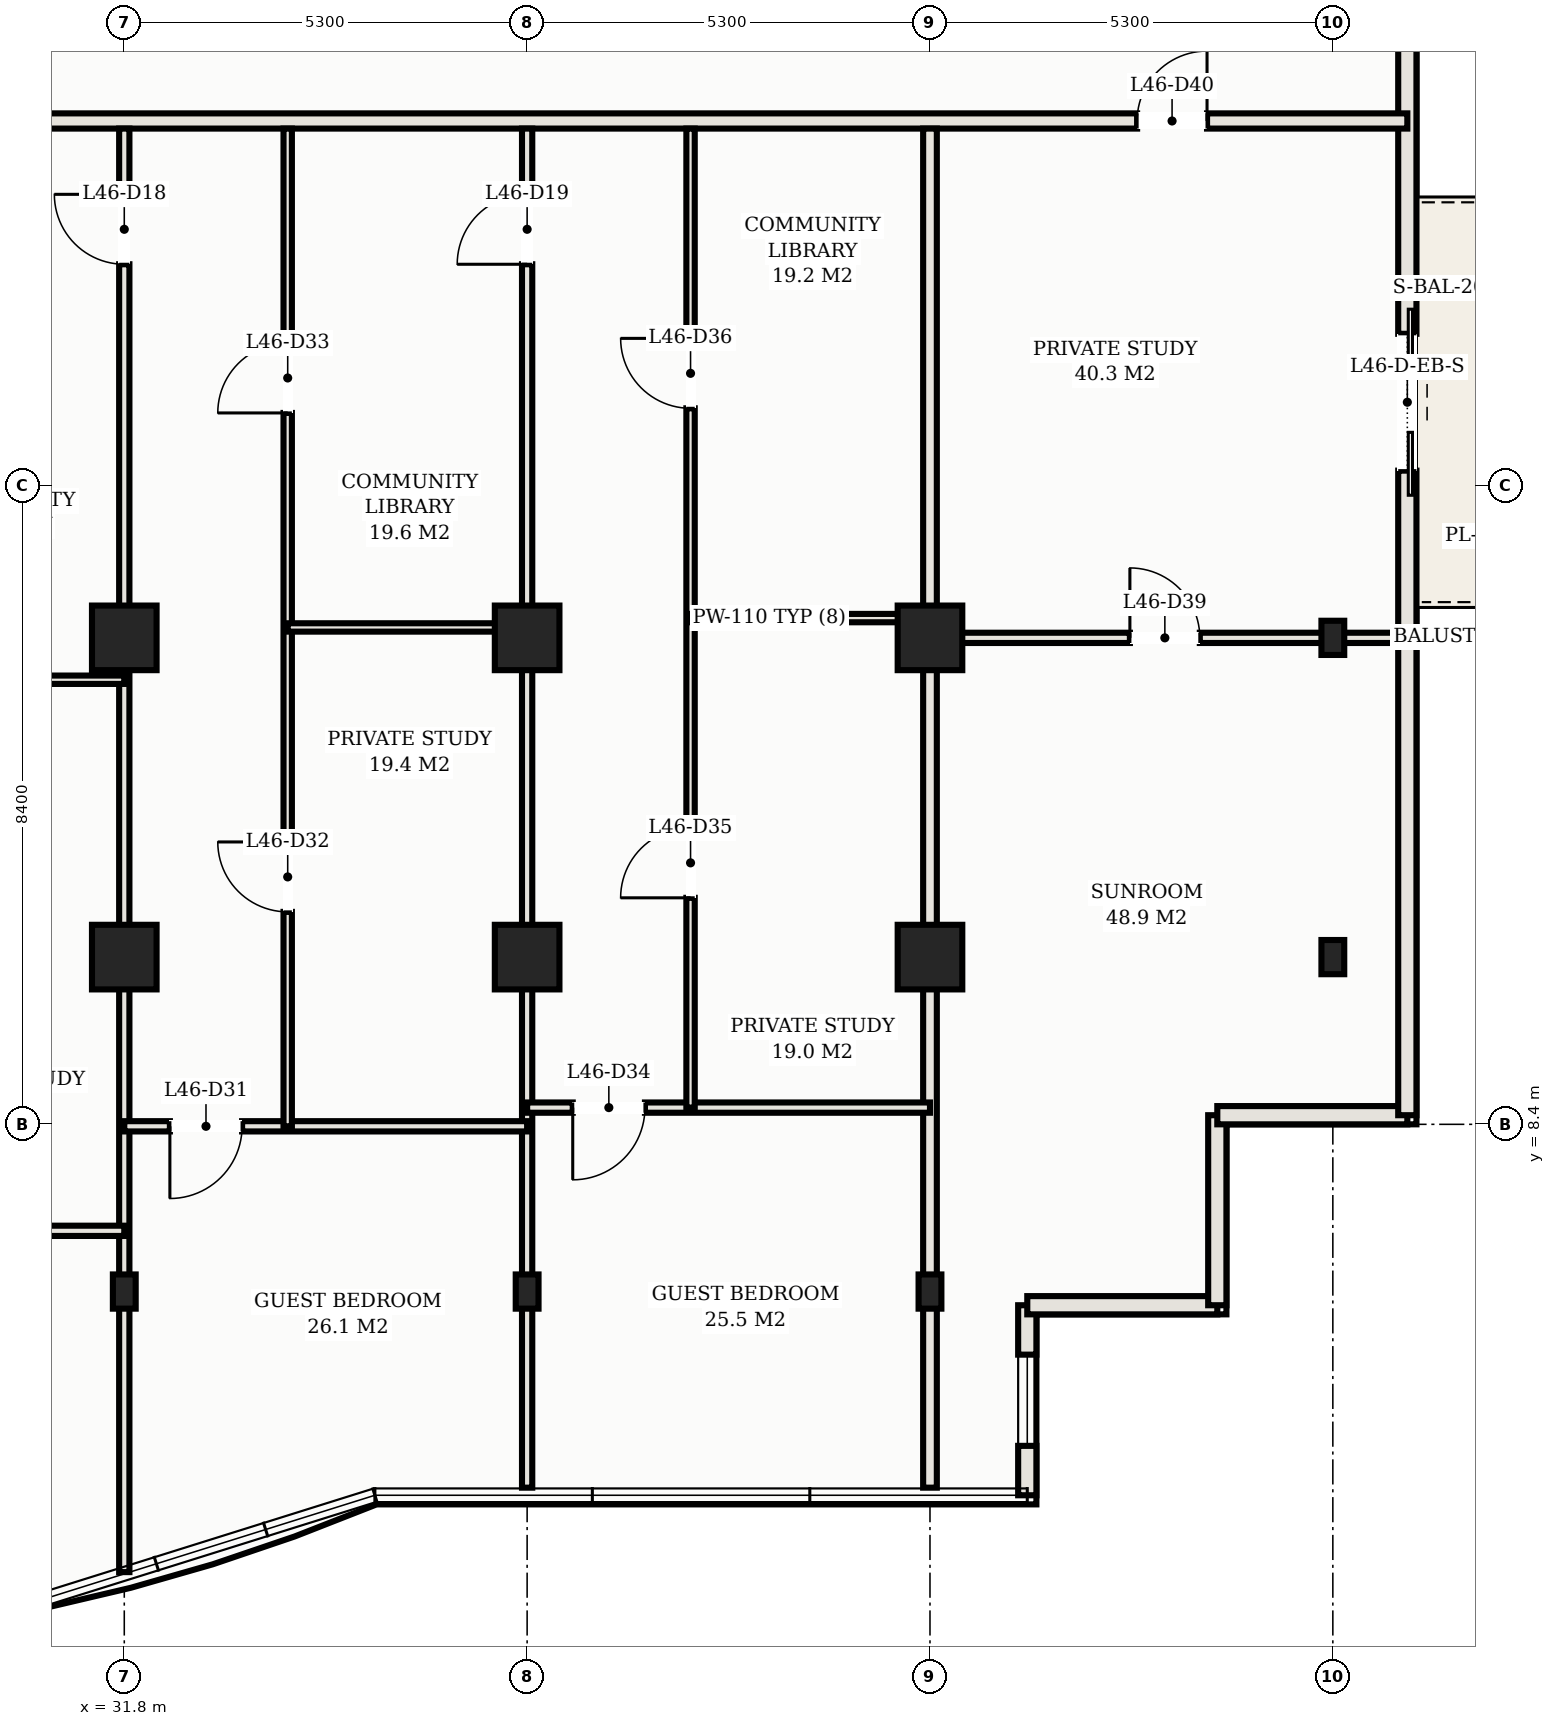
"""IFC4 building model, lengths in metres.
Left out: names, types, materials, properties, quantities, classifications, styles, units other than length and angle.
Written with IfcOpenShell. Run it as: python <this file> out.ifc"""

import sys

from ifc_helpers import new_model, si_unit, direction, frame, frame_2d, origin, origin_2d, place, context, subcontext, project, spatial, rectangle, hollow_rectangle, extrude, element, fill, save


model = new_model("IFC4")
c1 = context("Model", 3, precision=1e-05, world=origin(), true_north=direction((0.0, 1.0)))
c2 = subcontext(c1, "Body", "Model", "MODEL_VIEW")
j1 = project(units=[si_unit("LENGTHUNIT", "METRE"), si_unit("PLANEANGLEUNIT", "RADIAN")], contexts=[c1])
p1 = place(None, origin())
s1 = spatial("IfcSite", under=j1, at=p1, CompositionType="ELEMENT")
p2 = place(p1, origin())
s2 = spatial("IfcBuilding", under=s1, at=p2, CompositionType="ELEMENT")
p3 = place(p2, frame((0.0, 0.0, 168.9)))
s3 = spatial("IfcBuildingStorey", under=s2, at=p3, CompositionType="ELEMENT", Elevation=168.9)
for number, where, z_axis, x_axis in (
    (1, (31.8, 14.8, 0.0), (0.0, 0.0, 1.0), (1.0, 0.0, 0.0)),
    (2, (31.8, 10.6, 0.0), (0.0, 0.0, 1.0), (1.0, 0.0, 0.0)),
    (3, (37.1, 14.8, 0.0), (0.0, 0.0, 1.0), (1.0, 0.0, 0.0)),
    (4, (37.1, 10.6, 0.0), (0.0, 0.0, 1.0), (1.0, 0.0, 0.0)),
    (5, (42.4, 14.8, 0.0), (0.0, 0.0, 1.0), (1.0, 0.0, 0.0)),
    (6, (42.4, 10.6, 0.0), (0.0, 0.0, 1.0), (1.0, 0.0, 0.0)),
):
    element("IfcColumn", number, at=place(p3, frame(where, z_axis=z_axis, x_axis=x_axis)), inside=s3, PredefinedType="COLUMN", context=c2, shape_type="SweptSolid", body=[
        extrude(hollow_rectangle(XDim=0.85, YDim=0.85, WallThickness=0.028, at=origin_2d()), origin(), (0.0, 0.0, 1.0), 3.3),
    ])
for number, where, z_axis, x_axis in (
    (7, (31.8, 6.2, 0.0), (0.0, 0.0, 1.0), (1.0, 0.0, 0.0)),
    (8, (37.1, 6.2, 0.0), (0.0, 0.0, 1.0), (1.0, 0.0, 0.0)),
    (9, (42.4, 6.2, 0.0), (0.0, 0.0, 1.0), (1.0, 0.0, 0.0)),
    (10, (47.7, 10.6, 0.0), (0.0, 0.0, 1.0), (1.0, 0.0, 0.0)),
    (11, (47.7, 14.8, 0.0), (0.0, 0.0, 1.0), (1.0, 0.0, 0.0)),
):
    element("IfcColumn", number, at=place(p3, frame(where, z_axis=z_axis, x_axis=x_axis)), inside=s3, PredefinedType="COLUMN", context=c2, shape_type="SweptSolid", body=[
        extrude(hollow_rectangle(XDim=0.3, YDim=0.45, WallThickness=0.016, at=origin_2d()), origin(), (0.0, 0.0, 1.0), 3.3),
    ])
p4 = place(p3, frame((43.68, 3.52, 0.0), z_axis=(0.0, 0.0, 1.0), x_axis=(0.0, 1.0, 0.0)))
e12 = element("IfcWall", 12, at=p4, inside=s3, PredefinedType="SOLIDWALL", context=c2, shape_type="SweptSolid", body=[
    extrude(rectangle(XDim=2.5, YDim=0.24, at=frame_2d((1.25, 0.0))), origin(), (0.0, 0.0, 1.0), 3.1),
])
p5 = place(p4, frame((0.65, 0.0, 0.75)))
e13 = element("IfcOpeningElement", 13, at=p5, cuts=e12, PredefinedType="OPENING", context=c2, shape_type="SweptSolid", body=[
    extrude(rectangle(XDim=1.2, YDim=1.5, at=frame_2d((0.6, 0.75))), frame((0.0, 0.13, 0.0), z_axis=(0.0, -1.0, 0.0), x_axis=(1.0, 0.0, 0.0)), (0.0, 0.0, 1.0), 0.26),
])
for number, where, z_axis, x_axis in (
    (14, (43.68, 6.02, 0.0), (0.0, 0.0, 1.0), (1.0, 0.0, 0.0)),
    (15, (46.18, 6.02, 0.0), (0.0, 0.0, 1.0), (0.0, 1.0, 0.0)),
    (16, (46.18, 8.52, 0.0), (0.0, 0.0, 1.0), (1.0, 0.0, 0.0)),
):
    element("IfcWall", number, at=place(p3, frame(where, z_axis=z_axis, x_axis=x_axis)), inside=s3, PredefinedType="SOLIDWALL", context=c2, shape_type="SweptSolid", body=[
        extrude(rectangle(XDim=2.5, YDim=0.24, at=frame_2d((1.25, 0.0))), origin(), (0.0, 0.0, 1.0), 3.1),
    ])
p6 = place(p3, frame((48.68, 8.52, 0.0), z_axis=(0.0, 0.0, 1.0), x_axis=(0.0, 1.0, 0.0)))
e17 = element("IfcWall", 17, at=p6, inside=s3, PredefinedType="SOLIDWALL", context=c2, shape_type="SweptSolid", body=[
    extrude(rectangle(XDim=27.41, YDim=0.24, at=frame_2d((13.705, 0.0))), origin(), (0.0, 0.0, 1.0), 3.1),
])
p7 = place(p6, frame((8.48, 0.0, 0.0)))
e18 = element("IfcOpeningElement", 18, at=p7, cuts=e17, PredefinedType="OPENING", context=c2, shape_type="SweptSolid", body=[
    extrude(rectangle(XDim=1.8, YDim=2.2, at=frame_2d((0.9, 1.1))), frame((0.0, 0.13, 0.0), z_axis=(0.0, -1.0, 0.0), x_axis=(1.0, 0.0, 0.0)), (0.0, 0.0, 1.0), 0.26),
])
p8 = place(p3, frame((4.32, 21.6, 0.0), z_axis=(0.0, 0.0, 1.0), x_axis=(1.0, 0.0, 0.0)))
e19 = element("IfcWall", 19, at=p8, inside=s3, PredefinedType="PARTITIONING", context=c2, shape_type="SweptSolid", body=[
    extrude(rectangle(XDim=44.36, YDim=0.2, at=frame_2d((22.18, 0.0))), origin(), (0.0, 0.0, 1.0), 2.38),
])
p9 = place(p8, frame((7.03, 0.0, 0.0)))
e20 = element("IfcOpeningElement", 20, at=p9, cuts=e19, PredefinedType="OPENING", context=c2, shape_type="SweptSolid", body=[
    extrude(rectangle(XDim=1.1, YDim=2.25, at=frame_2d((0.55, 1.125))), frame((0.0, 0.11, 0.0), z_axis=(0.0, -1.0, 0.0), x_axis=(1.0, 0.0, 0.0)), (0.0, 0.0, 1.0), 0.22),
])
p10 = place(p8, frame((2.635, 0.0, 0.0)))
e21 = element("IfcOpeningElement", 21, at=p10, cuts=e19, PredefinedType="OPENING", context=c2, shape_type="SweptSolid", body=[
    extrude(rectangle(XDim=0.92, YDim=2.15, at=frame_2d((0.46, 1.075))), frame((0.0, 0.11, 0.0), z_axis=(0.0, -1.0, 0.0), x_axis=(1.0, 0.0, 0.0)), (0.0, 0.0, 1.0), 0.22),
])
p11 = place(p8, frame((40.805, 0.0, 0.0)))
e22 = element("IfcOpeningElement", 22, at=p11, cuts=e19, PredefinedType="OPENING", context=c2, shape_type="SweptSolid", body=[
    extrude(rectangle(XDim=0.92, YDim=2.15, at=frame_2d((0.46, 1.075))), frame((0.0, 0.11, 0.0), z_axis=(0.0, -1.0, 0.0), x_axis=(1.0, 0.0, 0.0)), (0.0, 0.0, 1.0), 0.22),
])
p12 = place(p3, frame((42.4, 3.62, 0.0), z_axis=(0.0, 0.0, 1.0), x_axis=(0.0, 1.0, 0.0)))
e23 = element("IfcWall", 23, at=p12, inside=s3, PredefinedType="PARTITIONING", context=c2, shape_type="SweptSolid", body=[
    extrude(rectangle(XDim=17.88, YDim=0.18, at=frame_2d((8.94, 0.0))), origin(), (0.0, 0.0, 1.0), 2.38),
])
p13 = place(p3, frame((31.8, 2.509, 0.0), z_axis=(0.0, 0.0, 1.0), x_axis=(0.0, 1.0, 0.0)))
e24 = element("IfcWall", 24, at=p13, inside=s3, PredefinedType="PARTITIONING", context=c2, shape_type="SweptSolid", body=[
    extrude(rectangle(XDim=18.991, YDim=0.135, at=frame_2d((9.496, 0.0))), origin(), (0.0, 0.0, 1.0), 2.38),
])
p14 = place(p13, frame((17.206, 0.0, 0.0)))
e25 = element("IfcOpeningElement", 25, at=p14, cuts=e24, PredefinedType="OPENING", context=c2, shape_type="SweptSolid", body=[
    extrude(rectangle(XDim=0.92, YDim=2.15, at=frame_2d((0.46, 1.075))), frame((0.0, 0.078, 0.0), z_axis=(0.0, -1.0, 0.0), x_axis=(1.0, 0.0, 0.0)), (0.0, 0.0, 1.0), 0.155),
])
p15 = place(p3, frame((37.1, 3.62, 0.0), z_axis=(0.0, 0.0, 1.0), x_axis=(0.0, 1.0, 0.0)))
e26 = element("IfcWall", 26, at=p15, inside=s3, PredefinedType="PARTITIONING", context=c2, shape_type="SweptSolid", body=[
    extrude(rectangle(XDim=17.88, YDim=0.135, at=frame_2d((8.94, 0.0))), origin(), (0.0, 0.0, 1.0), 2.38),
])
p16 = place(p15, frame((16.095, 0.0, 0.0)))
e27 = element("IfcOpeningElement", 27, at=p16, cuts=e26, PredefinedType="OPENING", context=c2, shape_type="SweptSolid", body=[
    extrude(rectangle(XDim=0.92, YDim=2.15, at=frame_2d((0.46, 1.075))), frame((0.0, 0.078, 0.0), z_axis=(0.0, -1.0, 0.0), x_axis=(1.0, 0.0, 0.0)), (0.0, 0.0, 1.0), 0.155),
])
p17 = place(p3, frame((26.5, 6.999, 0.0), z_axis=(0.0, 0.0, 1.0), x_axis=(1.0, 0.0, 0.0)))
e28 = element("IfcWall", 28, at=p17, inside=s3, PredefinedType="PARTITIONING", context=c2, shape_type="SweptSolid", body=[
    extrude(rectangle(XDim=5.3, YDim=0.135, at=frame_2d((2.65, 0.0))), origin(), (0.0, 0.0, 1.0), 2.38),
])
p18 = place(p17, frame((0.8, 0.0, 0.0)))
e29 = element("IfcOpeningElement", 29, at=p18, cuts=e28, PredefinedType="OPENING", context=c2, shape_type="SweptSolid", body=[
    extrude(rectangle(XDim=0.95, YDim=2.15, at=frame_2d((0.475, 1.075))), frame((0.0, 0.078, 0.0), z_axis=(0.0, -1.0, 0.0), x_axis=(1.0, 0.0, 0.0)), (0.0, 0.0, 1.0), 0.155),
])
p19 = place(p3, frame((28.65, 14.249, 0.0), z_axis=(0.0, 0.0, 1.0), x_axis=(1.0, 0.0, 0.0)))
e30 = element("IfcWall", 30, at=p19, inside=s3, PredefinedType="MOVABLE", context=c2, shape_type="SweptSolid", body=[
    extrude(rectangle(XDim=3.15, YDim=0.11, at=frame_2d((1.575, 0.0))), origin(), (0.0, 0.0, 1.0), 2.38),
])
p20 = place(p3, frame((31.8, 8.374, 0.0), z_axis=(0.0, 0.0, 1.0), x_axis=(1.0, 0.0, 0.0)))
e31 = element("IfcWall", 31, at=p20, inside=s3, PredefinedType="PARTITIONING", context=c2, shape_type="SweptSolid", body=[
    extrude(rectangle(XDim=5.3, YDim=0.135, at=frame_2d((2.65, 0.0))), origin(), (0.0, 0.0, 1.0), 2.38),
])
p21 = place(p20, frame((0.6, 0.0, 0.0)))
e32 = element("IfcOpeningElement", 32, at=p21, cuts=e31, PredefinedType="OPENING", context=c2, shape_type="SweptSolid", body=[
    extrude(rectangle(XDim=0.95, YDim=2.15, at=frame_2d((0.475, 1.075))), frame((0.0, 0.078, 0.0), z_axis=(0.0, -1.0, 0.0), x_axis=(1.0, 0.0, 0.0)), (0.0, 0.0, 1.0), 0.155),
])
p22 = place(p3, frame((33.95, 8.374, 0.0), z_axis=(0.0, 0.0, 1.0), x_axis=(0.0, 1.0, 0.0)))
e33 = element("IfcWall", 33, at=p22, inside=s3, PredefinedType="MOVABLE", context=c2, shape_type="SweptSolid", body=[
    extrude(rectangle(XDim=13.126, YDim=0.11, at=frame_2d((6.563, 0.0))), origin(), (0.0, 0.0, 1.0), 2.38),
])
p23 = place(p22, frame((2.821, 0.0, 0.0)))
e34 = element("IfcOpeningElement", 34, at=p23, cuts=e33, PredefinedType="OPENING", context=c2, shape_type="SweptSolid", body=[
    extrude(rectangle(XDim=0.92, YDim=2.15, at=frame_2d((0.46, 1.075))), frame((0.0, 0.065, 0.0), z_axis=(0.0, -1.0, 0.0), x_axis=(1.0, 0.0, 0.0)), (0.0, 0.0, 1.0), 0.13),
])
p24 = place(p22, frame((9.385, 0.0, 0.0)))
e35 = element("IfcOpeningElement", 35, at=p24, cuts=e33, PredefinedType="OPENING", context=c2, shape_type="SweptSolid", body=[
    extrude(rectangle(XDim=0.92, YDim=2.15, at=frame_2d((0.46, 1.075))), frame((0.0, 0.065, 0.0), z_axis=(0.0, -1.0, 0.0), x_axis=(1.0, 0.0, 0.0)), (0.0, 0.0, 1.0), 0.13),
])
p25 = place(p3, frame((33.95, 14.937, 0.0), z_axis=(0.0, 0.0, 1.0), x_axis=(1.0, 0.0, 0.0)))
e36 = element("IfcWall", 36, at=p25, inside=s3, PredefinedType="MOVABLE", context=c2, shape_type="SweptSolid", body=[
    extrude(rectangle(XDim=3.15, YDim=0.11, at=frame_2d((1.575, 0.0))), origin(), (0.0, 0.0, 1.0), 2.38),
])
p26 = place(p3, frame((37.1, 8.62, 0.0), z_axis=(0.0, 0.0, 1.0), x_axis=(1.0, 0.0, 0.0)))
e37 = element("IfcWall", 37, at=p26, inside=s3, PredefinedType="PARTITIONING", context=c2, shape_type="SweptSolid", body=[
    extrude(rectangle(XDim=5.3, YDim=0.135, at=frame_2d((2.65, 0.0))), origin(), (0.0, 0.0, 1.0), 2.38),
])
p27 = place(p26, frame((0.6, 0.0, 0.0)))
e38 = element("IfcOpeningElement", 38, at=p27, cuts=e37, PredefinedType="OPENING", context=c2, shape_type="SweptSolid", body=[
    extrude(rectangle(XDim=0.95, YDim=2.15, at=frame_2d((0.475, 1.075))), frame((0.0, 0.078, 0.0), z_axis=(0.0, -1.0, 0.0), x_axis=(1.0, 0.0, 0.0)), (0.0, 0.0, 1.0), 0.155),
])
p28 = place(p3, frame((39.25, 8.62, 0.0), z_axis=(0.0, 0.0, 1.0), x_axis=(0.0, 1.0, 0.0)))
e39 = element("IfcWall", 39, at=p28, inside=s3, PredefinedType="MOVABLE", context=c2, shape_type="SweptSolid", body=[
    extrude(rectangle(XDim=12.88, YDim=0.11, at=frame_2d((6.44, 0.0))), origin(), (0.0, 0.0, 1.0), 2.38),
])
p29 = place(p28, frame((2.76, 0.0, 0.0)))
e40 = element("IfcOpeningElement", 40, at=p29, cuts=e39, PredefinedType="OPENING", context=c2, shape_type="SweptSolid", body=[
    extrude(rectangle(XDim=0.92, YDim=2.15, at=frame_2d((0.46, 1.075))), frame((0.0, 0.065, 0.0), z_axis=(0.0, -1.0, 0.0), x_axis=(1.0, 0.0, 0.0)), (0.0, 0.0, 1.0), 0.13),
])
p30 = place(p28, frame((9.2, 0.0, 0.0)))
e41 = element("IfcOpeningElement", 41, at=p30, cuts=e39, PredefinedType="OPENING", context=c2, shape_type="SweptSolid", body=[
    extrude(rectangle(XDim=0.92, YDim=2.15, at=frame_2d((0.46, 1.075))), frame((0.0, 0.065, 0.0), z_axis=(0.0, -1.0, 0.0), x_axis=(1.0, 0.0, 0.0)), (0.0, 0.0, 1.0), 0.13),
])
p31 = place(p3, frame((39.25, 15.06, 0.0), z_axis=(0.0, 0.0, 1.0), x_axis=(1.0, 0.0, 0.0)))
e42 = element("IfcWall", 42, at=p31, inside=s3, PredefinedType="MOVABLE", context=c2, shape_type="SweptSolid", body=[
    extrude(rectangle(XDim=3.15, YDim=0.11, at=frame_2d((1.575, 0.0))), origin(), (0.0, 0.0, 1.0), 2.38),
])
p32 = place(p3, frame((42.4, 14.8, 0.0), z_axis=(0.0, 0.0, 1.0), x_axis=(1.0, 0.0, 0.0)))
e43 = element("IfcWall", 43, at=p32, inside=s3, PredefinedType="PARTITIONING", context=c2, shape_type="SweptSolid", body=[
    extrude(rectangle(XDim=6.18, YDim=0.135, at=frame_2d((3.09, 0.0))), origin(), (0.0, 0.0, 1.0), 2.38),
])
p33 = place(p32, frame((2.63, 0.0, 0.0)))
e44 = element("IfcOpeningElement", 44, at=p33, cuts=e43, PredefinedType="OPENING", context=c2, shape_type="SweptSolid", body=[
    extrude(rectangle(XDim=0.92, YDim=2.15, at=frame_2d((0.46, 1.075))), frame((0.0, 0.078, 0.0), z_axis=(0.0, -1.0, 0.0), x_axis=(1.0, 0.0, 0.0)), (0.0, 0.0, 1.0), 0.155),
])
p34 = place(p5, origin())
e45 = element("IfcWindow", 45, at=p34, inside=s3, PartitioningType="SINGLE_PANEL", PredefinedType="WINDOW", context=c2, shape_type="SweptSolid", body=[
    extrude(rectangle(XDim=1.2, YDim=1.5, at=frame_2d((0.6, 0.75))), frame((0.0, 0.03, 0.0), z_axis=(0.0, -1.0, 0.0), x_axis=(1.0, 0.0, 0.0)), (0.0, 0.0, 1.0), 0.06),
])
fill(e13, e45)
p35 = place(p7, frame((1.8, 0.0, 0.0), z_axis=(0.0, 0.0, 1.0), x_axis=(-1.0, 0.0, 0.0)))
e46 = element("IfcDoor", 46, at=p35, inside=s3, OperationType="DOUBLE_DOOR_SLIDING", PredefinedType="DOOR", context=c2, shape_type="SweptSolid", body=[
    extrude(rectangle(XDim=1.8, YDim=2.2, at=frame_2d((0.9, 1.1))), frame((0.0, 0.025, 0.0), z_axis=(0.0, -1.0, 0.0), x_axis=(1.0, 0.0, 0.0)), (0.0, 0.0, 1.0), 0.05),
])
fill(e18, e46)
p36 = place(p14, origin())
e47 = element("IfcDoor", 47, at=p36, inside=s3, OperationType="SINGLE_SWING_RIGHT", PredefinedType="DOOR", context=c2, shape_type="SweptSolid", body=[
    extrude(rectangle(XDim=0.92, YDim=2.15, at=frame_2d((0.46, 1.075))), frame((0.0, 0.025, 0.0), z_axis=(0.0, -1.0, 0.0), x_axis=(1.0, 0.0, 0.0)), (0.0, 0.0, 1.0), 0.05),
])
fill(e25, e47)
p37 = place(p16, origin())
e48 = element("IfcDoor", 48, at=p37, inside=s3, OperationType="SINGLE_SWING_LEFT", PredefinedType="DOOR", context=c2, shape_type="SweptSolid", body=[
    extrude(rectangle(XDim=0.92, YDim=2.15, at=frame_2d((0.46, 1.075))), frame((0.0, 0.025, 0.0), z_axis=(0.0, -1.0, 0.0), x_axis=(1.0, 0.0, 0.0)), (0.0, 0.0, 1.0), 0.05),
])
fill(e27, e48)
p38 = place(p21, frame((0.95, 0.0, 0.0), z_axis=(0.0, 0.0, 1.0), x_axis=(-1.0, 0.0, 0.0)))
e49 = element("IfcDoor", 49, at=p38, inside=s3, OperationType="SINGLE_SWING_RIGHT", PredefinedType="DOOR", context=c2, shape_type="SweptSolid", body=[
    extrude(rectangle(XDim=0.95, YDim=2.15, at=frame_2d((0.475, 1.075))), frame((0.0, 0.025, 0.0), z_axis=(0.0, -1.0, 0.0), x_axis=(1.0, 0.0, 0.0)), (0.0, 0.0, 1.0), 0.05),
])
fill(e32, e49)
p39 = place(p23, origin())
e50 = element("IfcDoor", 50, at=p39, inside=s3, OperationType="SINGLE_SWING_RIGHT", PredefinedType="DOOR", context=c2, shape_type="SweptSolid", body=[
    extrude(rectangle(XDim=0.92, YDim=2.15, at=frame_2d((0.46, 1.075))), frame((0.0, 0.025, 0.0), z_axis=(0.0, -1.0, 0.0), x_axis=(1.0, 0.0, 0.0)), (0.0, 0.0, 1.0), 0.05),
])
fill(e34, e50)
p40 = place(p24, origin())
e51 = element("IfcDoor", 51, at=p40, inside=s3, OperationType="SINGLE_SWING_LEFT", PredefinedType="DOOR", context=c2, shape_type="SweptSolid", body=[
    extrude(rectangle(XDim=0.92, YDim=2.15, at=frame_2d((0.46, 1.075))), frame((0.0, 0.025, 0.0), z_axis=(0.0, -1.0, 0.0), x_axis=(1.0, 0.0, 0.0)), (0.0, 0.0, 1.0), 0.05),
])
fill(e35, e51)
p41 = place(p27, frame((0.95, 0.0, 0.0), z_axis=(0.0, 0.0, 1.0), x_axis=(-1.0, 0.0, 0.0)))
e52 = element("IfcDoor", 52, at=p41, inside=s3, OperationType="SINGLE_SWING_RIGHT", PredefinedType="DOOR", context=c2, shape_type="SweptSolid", body=[
    extrude(rectangle(XDim=0.95, YDim=2.15, at=frame_2d((0.475, 1.075))), frame((0.0, 0.025, 0.0), z_axis=(0.0, -1.0, 0.0), x_axis=(1.0, 0.0, 0.0)), (0.0, 0.0, 1.0), 0.05),
])
fill(e38, e52)
p42 = place(p29, origin())
e53 = element("IfcDoor", 53, at=p42, inside=s3, OperationType="SINGLE_SWING_LEFT", PredefinedType="DOOR", context=c2, shape_type="SweptSolid", body=[
    extrude(rectangle(XDim=0.92, YDim=2.15, at=frame_2d((0.46, 1.075))), frame((0.0, 0.025, 0.0), z_axis=(0.0, -1.0, 0.0), x_axis=(1.0, 0.0, 0.0)), (0.0, 0.0, 1.0), 0.05),
])
fill(e40, e53)
p43 = place(p30, origin())
e54 = element("IfcDoor", 54, at=p43, inside=s3, OperationType="SINGLE_SWING_RIGHT", PredefinedType="DOOR", context=c2, shape_type="SweptSolid", body=[
    extrude(rectangle(XDim=0.92, YDim=2.15, at=frame_2d((0.46, 1.075))), frame((0.0, 0.025, 0.0), z_axis=(0.0, -1.0, 0.0), x_axis=(1.0, 0.0, 0.0)), (0.0, 0.0, 1.0), 0.05),
])
fill(e41, e54)
p44 = place(p33, origin())
e55 = element("IfcDoor", 55, at=p44, inside=s3, OperationType="SINGLE_SWING_LEFT", PredefinedType="DOOR", context=c2, shape_type="SweptSolid", body=[
    extrude(rectangle(XDim=0.92, YDim=2.15, at=frame_2d((0.46, 1.075))), frame((0.0, 0.025, 0.0), z_axis=(0.0, -1.0, 0.0), x_axis=(1.0, 0.0, 0.0)), (0.0, 0.0, 1.0), 0.05),
])
fill(e44, e55)
p45 = place(p11, origin())
e56 = element("IfcDoor", 56, at=p45, inside=s3, OperationType="SINGLE_SWING_RIGHT", PredefinedType="DOOR", context=c2, shape_type="SweptSolid", body=[
    extrude(rectangle(XDim=0.92, YDim=2.15, at=frame_2d((0.46, 1.075))), frame((0.0, 0.025, 0.0), z_axis=(0.0, -1.0, 0.0), x_axis=(1.0, 0.0, 0.0)), (0.0, 0.0, 1.0), 0.05),
])
fill(e22, e56)
save(model, sys.argv[1])
